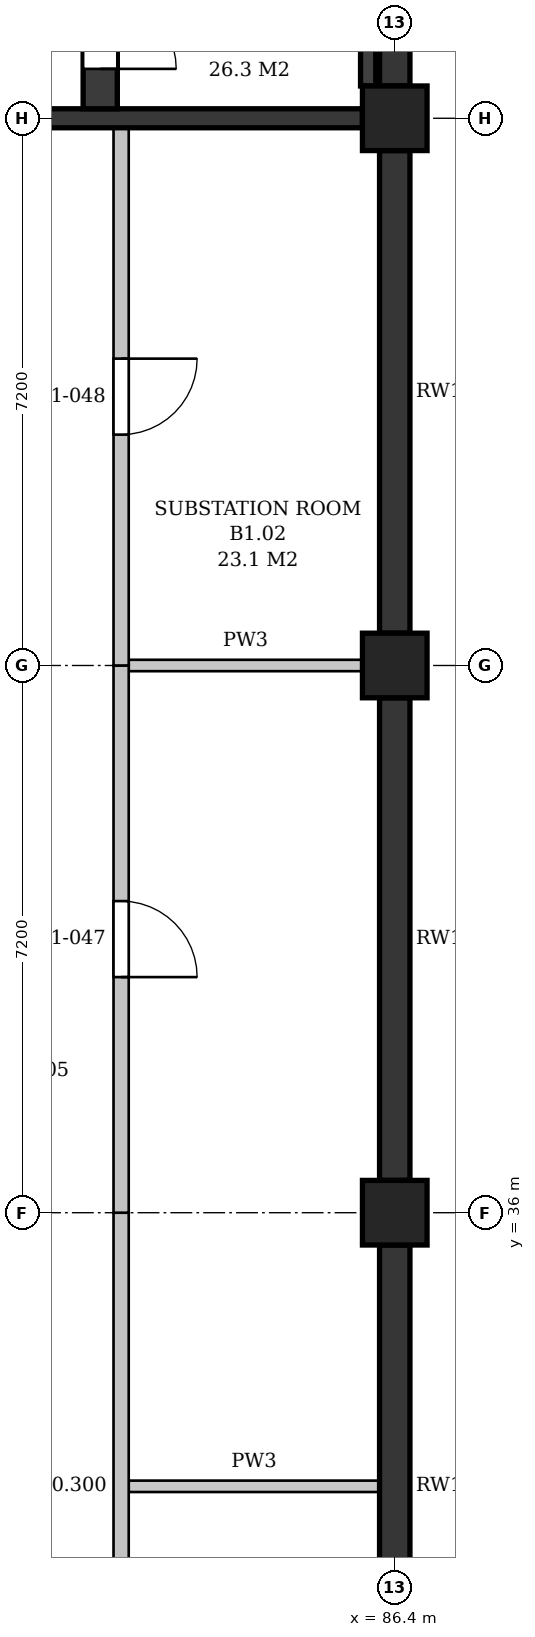
"""IFC4 building model, lengths in metres.
Left out: names, types, materials, properties, quantities, classifications, styles, units other than length and angle.
Written with IfcOpenShell. Run it as: python <this file> out.ifc"""

import sys

from ifc_helpers import new_model, si_unit, direction, frame, frame_2d, origin, origin_2d, place, context, subcontext, project, spatial, polyline, rectangle, outline, extrude, element, fill, save


model = new_model("IFC4")
c1 = context("Model", 3, precision=1e-05, world=origin(), true_north=direction((0.0, 1.0)))
c2 = subcontext(c1, "Body", "Model", "MODEL_VIEW")
j1 = project(units=[si_unit("LENGTHUNIT", "METRE"), si_unit("PLANEANGLEUNIT", "RADIAN")], contexts=[c1])
p1 = place(None, origin())
s1 = spatial("IfcSite", under=j1, at=p1, CompositionType="ELEMENT")
p2 = place(p1, origin())
s2 = spatial("IfcBuilding", under=s1, at=p2, CompositionType="ELEMENT")
p3 = place(p2, frame((0.0, 0.0, -4.5)))
s3 = spatial("IfcBuildingStorey", under=s2, at=p3, CompositionType="ELEMENT", Elevation=-4.5)
for number, where, z_axis, x_axis in (
    (1, (86.4, 36.0, 0.0), (0.0, 0.0, 1.0), (1.0, 0.0, 0.0)),
    (2, (86.4, 43.2, 0.0), (0.0, 0.0, 1.0), (1.0, 0.0, 0.0)),
    (3, (86.4, 50.4, 0.0), (0.0, 0.0, 1.0), (1.0, 0.0, 0.0)),
):
    element("IfcColumn", number, at=place(p3, frame(where, z_axis=z_axis, x_axis=x_axis)), inside=s3, PredefinedType="COLUMN", context=c2, shape_type="SweptSolid", body=[
        extrude(rectangle(XDim=0.85, YDim=0.85, at=origin_2d()), origin(), (0.0, 0.0, 1.0), 4.5),
    ])
for number, where, z_axis, x_axis in (
    (4, (86.4, 29.225, 0.0), (0.0, 0.0, 1.0), (0.0, 1.0, 0.0)),
    (5, (86.4, 36.425, 0.0), (0.0, 0.0, 1.0), (0.0, 1.0, 0.0)),
):
    element("IfcWall", number, at=place(p3, frame(where, z_axis=z_axis, x_axis=x_axis)), inside=s3, PredefinedType="SOLIDWALL", context=c2, shape_type="SweptSolid", body=[
        extrude(rectangle(XDim=6.35, YDim=0.4, at=frame_2d((3.175, 0.0))), origin(), (0.0, 0.0, 1.0), 3.6),
    ])
for number, where, z_axis, x_axis in (
    (6, (86.4, 43.625, 0.0), (0.0, 0.0, 1.0), (0.0, 1.0, 0.0)),
    (7, (86.4, 50.825, 0.0), (0.0, 0.0, 1.0), (0.0, 1.0, 0.0)),
):
    element("IfcWall", number, at=place(p3, frame(where, z_axis=z_axis, x_axis=x_axis)), inside=s3, PredefinedType="SOLIDWALL", context=c2, shape_type="SweptSolid", body=[
        extrude(rectangle(XDim=6.35, YDim=0.4, at=frame_2d((3.175, 0.0))), origin(), (0.0, 0.0, 1.0), 3.6),
    ])
p4 = place(p3, frame((79.625, 50.4, 0.0), z_axis=(0.0, 0.0, 1.0), x_axis=(1.0, 0.0, 0.0)))
e8 = element("IfcWall", 8, at=p4, inside=s3, PredefinedType="SHEAR", context=c2, shape_type="SweptSolid", body=[
    extrude(rectangle(XDim=6.35, YDim=0.25, at=frame_2d((3.175, 0.0))), origin(), (0.0, 0.0, 1.0), 3.4),
])
p5 = place(p4, frame((0.425, 0.0, 0.0)))
e9 = element("IfcOpeningElement", 9, at=p5, cuts=e8, PredefinedType="OPENING", context=c2, shape_type="SweptSolid", body=[
    extrude(rectangle(XDim=1.1, YDim=2.1, at=frame_2d((0.55, 1.05))), frame((0.0, 0.135, 0.0), z_axis=(0.0, -1.0, 0.0), x_axis=(1.0, 0.0, 0.0)), (0.0, 0.0, 1.0), 0.27),
])
p6 = place(p3, frame((86.05, 50.825, 0.0), z_axis=(0.0, 0.0, 1.0), x_axis=(0.0, 1.0, 0.0)))
e10 = element("IfcWall", 10, at=p6, inside=s3, PredefinedType="SHEAR", context=c2, shape_type="SweptSolid", body=[
    extrude(rectangle(XDim=6.35, YDim=0.2, at=frame_2d((3.175, 0.0))), origin(), (0.0, 0.0, 1.0), 4.2),
])
p7 = place(p3, frame((82.525, 50.525, 0.0), z_axis=(0.0, 0.0, 1.0), x_axis=(0.0, 1.0, 0.0)))
e11 = element("IfcWall", 11, at=p7, inside=s3, PredefinedType="SHEAR", context=c2, shape_type="SweptSolid", body=[
    extrude(rectangle(XDim=6.875, YDim=0.45, at=frame_2d((3.438, 0.0))), origin(), (0.0, 0.0, 1.0), 4.2),
])
p8 = place(p7, frame((0.525, 0.0, 0.0)))
e12 = element("IfcOpeningElement", 12, at=p8, cuts=e11, PredefinedType="OPENING", context=c2, shape_type="SweptSolid", body=[
    extrude(rectangle(XDim=1.0, YDim=2.1, at=frame_2d((0.5, 1.05))), frame((0.0, 0.235, 0.0), z_axis=(0.0, -1.0, 0.0), x_axis=(1.0, 0.0, 0.0)), (0.0, 0.0, 1.0), 0.47),
])
p9 = place(p3, frame((82.9, 32.4, 0.0), z_axis=(0.0, 0.0, 1.0), x_axis=(1.0, 0.0, 0.0)))
e13 = element("IfcWall", 13, at=p9, inside=s3, PredefinedType="PARTITIONING", context=c2, shape_type="SweptSolid", body=[
    extrude(rectangle(XDim=3.3, YDim=0.15, at=frame_2d((1.65, 0.0))), origin(), (0.0, 0.0, 1.0), 3.4),
])
p10 = place(p3, frame((82.9, 43.2, 0.0), z_axis=(0.0, 0.0, 1.0), x_axis=(1.0, 0.0, 0.0)))
e14 = element("IfcWall", 14, at=p10, inside=s3, PredefinedType="PARTITIONING", context=c2, shape_type="SweptSolid", body=[
    extrude(rectangle(XDim=3.075, YDim=0.15, at=frame_2d((1.538, 0.0))), origin(), (0.0, 0.0, 1.0), 3.4),
])
p11 = place(p3, frame((82.8, 28.8, 0.0), z_axis=(0.0, 0.0, 1.0), x_axis=(0.0, 1.0, 0.0)))
e15 = element("IfcWall", 15, at=p11, inside=s3, PredefinedType="PARTITIONING", context=c2, shape_type="SweptSolid", body=[
    extrude(outline(polyline([(0.0, 0.0), (7.2, 0.0), (7.2, 3.4), (6.9, 3.4), (6.9, 4.2), (0.3, 4.2), (0.3, 3.4), (0.0, 3.4), (0.0, 0.0)])), frame((0.0, 0.1, 0.0), z_axis=(0.0, -1.0, 0.0), x_axis=(1.0, 0.0, 0.0)), (0.0, 0.0, 1.0), 0.2),
])
p12 = place(p3, frame((82.8, 36.0, 0.0), z_axis=(0.0, 0.0, 1.0), x_axis=(0.0, 1.0, 0.0)))
e16 = element("IfcWall", 16, at=p12, inside=s3, PredefinedType="PARTITIONING", context=c2, shape_type="SweptSolid", body=[
    extrude(outline(polyline([(0.0, 0.0), (7.2, 0.0), (7.2, 3.4), (6.9, 3.4), (6.9, 4.2), (0.3, 4.2), (0.3, 3.4), (0.0, 3.4), (0.0, 0.0)])), frame((0.0, 0.1, 0.0), z_axis=(0.0, -1.0, 0.0), x_axis=(1.0, 0.0, 0.0)), (0.0, 0.0, 1.0), 0.2),
])
p13 = place(p12, frame((3.1, 0.0, 0.0)))
e17 = element("IfcOpeningElement", 17, at=p13, cuts=e16, PredefinedType="OPENING", context=c2, shape_type="SweptSolid", body=[
    extrude(rectangle(XDim=1.0, YDim=2.1, at=frame_2d((0.5, 1.05))), frame((0.0, 0.11, 0.0), z_axis=(0.0, -1.0, 0.0), x_axis=(1.0, 0.0, 0.0)), (0.0, 0.0, 1.0), 0.22),
])
p14 = place(p3, frame((82.8, 43.2, 0.0), z_axis=(0.0, 0.0, 1.0), x_axis=(0.0, 1.0, 0.0)))
e18 = element("IfcWall", 18, at=p14, inside=s3, PredefinedType="PARTITIONING", context=c2, shape_type="SweptSolid", body=[
    extrude(outline(polyline([(0.0, 0.0), (7.075, 0.0), (7.075, 3.4), (6.9, 3.4), (6.9, 4.2), (0.3, 4.2), (0.3, 3.4), (0.0, 3.4), (0.0, 0.0)])), frame((0.0, 0.1, 0.0), z_axis=(0.0, -1.0, 0.0), x_axis=(1.0, 0.0, 0.0)), (0.0, 0.0, 1.0), 0.2),
])
p15 = place(p14, frame((3.038, 0.0, 0.0)))
e19 = element("IfcOpeningElement", 19, at=p15, cuts=e18, PredefinedType="OPENING", context=c2, shape_type="SweptSolid", body=[
    extrude(rectangle(XDim=1.0, YDim=2.1, at=frame_2d((0.5, 1.05))), frame((0.0, 0.11, 0.0), z_axis=(0.0, -1.0, 0.0), x_axis=(1.0, 0.0, 0.0)), (0.0, 0.0, 1.0), 0.22),
])
p16 = place(p8, frame((1.0, 0.0, 0.0), z_axis=(0.0, 0.0, 1.0), x_axis=(-1.0, 0.0, 0.0)))
e20 = element("IfcDoor", 20, at=p16, inside=s3, OperationType="SINGLE_SWING_RIGHT", PredefinedType="DOOR", context=c2, shape_type="SweptSolid", body=[
    extrude(rectangle(XDim=1.0, YDim=2.1, at=frame_2d((0.5, 1.05))), frame((0.0, 0.025, 0.0), z_axis=(0.0, -1.0, 0.0), x_axis=(1.0, 0.0, 0.0)), (0.0, 0.0, 1.0), 0.05),
])
fill(e12, e20)
p17 = place(p13, frame((1.0, 0.0, 0.0), z_axis=(0.0, 0.0, 1.0), x_axis=(-1.0, 0.0, 0.0)))
e21 = element("IfcDoor", 21, at=p17, inside=s3, OperationType="SINGLE_SWING_RIGHT", PredefinedType="DOOR", context=c2, shape_type="SweptSolid", body=[
    extrude(rectangle(XDim=1.0, YDim=2.1, at=frame_2d((0.5, 1.05))), frame((0.0, 0.025, 0.0), z_axis=(0.0, -1.0, 0.0), x_axis=(1.0, 0.0, 0.0)), (0.0, 0.0, 1.0), 0.05),
])
fill(e17, e21)
p18 = place(p15, frame((1.0, 0.0, 0.0), z_axis=(0.0, 0.0, 1.0), x_axis=(-1.0, 0.0, 0.0)))
e22 = element("IfcDoor", 22, at=p18, inside=s3, OperationType="SINGLE_SWING_LEFT", PredefinedType="DOOR", context=c2, shape_type="SweptSolid", body=[
    extrude(rectangle(XDim=1.0, YDim=2.1, at=frame_2d((0.5, 1.05))), frame((0.0, 0.025, 0.0), z_axis=(0.0, -1.0, 0.0), x_axis=(1.0, 0.0, 0.0)), (0.0, 0.0, 1.0), 0.05),
])
fill(e19, e22)
save(model, sys.argv[1])
